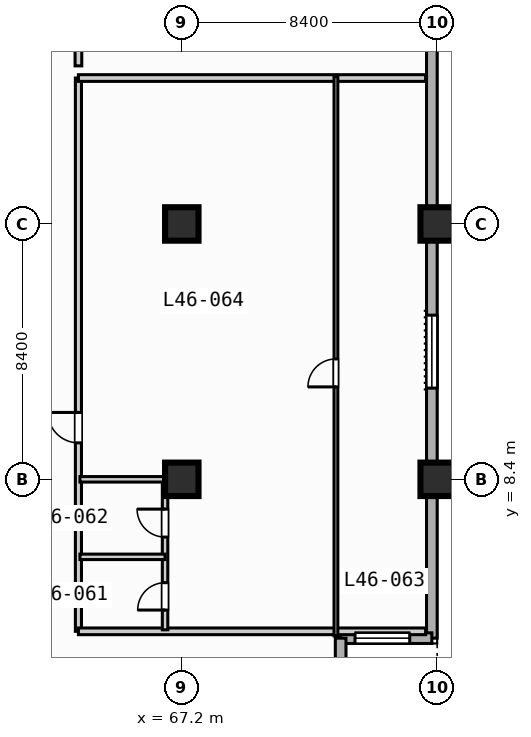
"""IFC4 building model, lengths in metres.
Left out: names, types, materials, properties, quantities, classifications, styles, units other than length and angle.
Written with IfcOpenShell. Run it as: python <this file> out.ifc"""

import sys

from ifc_helpers import new_model, si_unit, direction, frame, frame_2d, origin, origin_2d, place, context, subcontext, project, spatial, rectangle, extrude, element, fill, save


model = new_model("IFC4")
c1 = context("Model", 3, precision=1e-05, world=origin(), true_north=direction((0.0, 1.0)))
c2 = subcontext(c1, "Body", "Model", "MODEL_VIEW")
j1 = project(units=[si_unit("LENGTHUNIT", "METRE"), si_unit("PLANEANGLEUNIT", "RADIAN")], contexts=[c1])
p1 = place(None, origin())
s1 = spatial("IfcSite", under=j1, at=p1, CompositionType="ELEMENT")
p2 = place(p1, origin())
s2 = spatial("IfcBuilding", under=s1, at=p2, CompositionType="ELEMENT")
p3 = place(p2, frame((0.0, 0.0, 190.2)))
s3 = spatial("IfcBuildingStorey", under=s2, at=p3, CompositionType="ELEMENT", Elevation=190.2)
for number, where, z_axis, x_axis in (
    (1, (67.2, 8.4, 0.0), (0.0, 0.0, 1.0), (1.0, 0.0, 0.0)),
    (2, (67.2, 16.8, 0.0), (0.0, 0.0, 1.0), (1.0, 0.0, 0.0)),
    (3, (75.6, 8.4, 0.0), (0.0, 0.0, 1.0), (1.0, 0.0, 0.0)),
    (4, (75.6, 16.8, 0.0), (0.0, 0.0, 1.0), (1.0, 0.0, 0.0)),
):
    element("IfcColumn", number, at=place(p3, frame(where, z_axis=z_axis, x_axis=x_axis)), inside=s3, PredefinedType="COLUMN", context=c2, shape_type="SweptSolid", body=[
        extrude(rectangle(XDim=1.1, YDim=1.1, at=origin_2d()), origin(), (0.0, 0.0, 1.0), 3.7),
    ])
p4 = place(p3, frame((75.425, 30.425, 0.0), z_axis=(0.0, 0.0, 1.0), x_axis=(0.0, -1.0, 0.0)))
e5 = element("IfcWall", 5, at=p4, inside=s3, PredefinedType="STANDARD", context=c2, shape_type="SweptSolid", body=[
    extrude(rectangle(XDim=27.25, YDim=0.35, at=frame_2d((13.625, 0.0))), origin(), (0.0, 0.0, 1.0), 3.47),
])
p5 = place(p4, frame((16.625, 0.0, 0.85)))
e6 = element("IfcOpeningElement", 6, at=p5, cuts=e5, PredefinedType="OPENING", context=c2, shape_type="SweptSolid", body=[
    extrude(rectangle(XDim=2.4, YDim=1.95, at=frame_2d((1.2, 0.975))), frame((0.0, 0.185, 0.0), z_axis=(0.0, -1.0, 0.0), x_axis=(1.0, 0.0, 0.0)), (0.0, 0.0, 1.0), 0.37),
])
p6 = place(p3, frame((75.425, 3.175, 0.0), z_axis=(0.0, 0.0, 1.0), x_axis=(-1.0, 0.0, 0.0)))
e7 = element("IfcWall", 7, at=p6, inside=s3, PredefinedType="STANDARD", context=c2, shape_type="SweptSolid", body=[
    extrude(rectangle(XDim=3.0, YDim=0.35, at=frame_2d((1.5, 0.0))), origin(), (0.0, 0.0, 1.0), 3.47),
])
p7 = place(p6, frame((0.728, 0.0, 0.85)))
e8 = element("IfcOpeningElement", 8, at=p7, cuts=e7, PredefinedType="OPENING", context=c2, shape_type="SweptSolid", body=[
    extrude(rectangle(XDim=1.8, YDim=1.8, at=frame_2d((0.9, 0.9))), frame((0.0, 0.185, 0.0), z_axis=(0.0, -1.0, 0.0), x_axis=(1.0, 0.0, 0.0)), (0.0, 0.0, 1.0), 0.37),
])
p8 = place(p3, frame((72.425, 3.175, 0.0), z_axis=(0.0, 0.0, 1.0), x_axis=(0.0, -1.0, 0.0)))
e9 = element("IfcWall", 9, at=p8, inside=s3, PredefinedType="STANDARD", context=c2, shape_type="SweptSolid", body=[
    extrude(rectangle(XDim=3.0, YDim=0.35, at=frame_2d((1.5, 0.0))), origin(), (0.0, 0.0, 1.0), 3.47),
])
p9 = place(p3, frame((63.8, 3.4, 0.0), z_axis=(0.0, 0.0, 1.0), x_axis=(0.0, 1.0, 0.0)))
e10 = element("IfcWall", 10, at=p9, inside=s3, PredefinedType="PARTITIONING", context=c2, shape_type="SweptSolid", body=[
    extrude(rectangle(XDim=18.2, YDim=0.2, at=frame_2d((9.1, 0.0))), origin(), (0.0, 0.0, 1.0), 3.47),
])
p10 = place(p9, frame((6.2, 0.0, 0.0)))
e11 = element("IfcOpeningElement", 11, at=p10, cuts=e10, PredefinedType="OPENING", context=c2, shape_type="SweptSolid", body=[
    extrude(rectangle(XDim=1.0, YDim=2.15, at=frame_2d((0.5, 1.075))), frame((0.0, 0.11, 0.0), z_axis=(0.0, -1.0, 0.0), x_axis=(1.0, 0.0, 0.0)), (0.0, 0.0, 1.0), 0.22),
])
for number, where, z_axis, x_axis in (
    (12, (63.8, 3.4, 0.0), (0.0, 0.0, 1.0), (1.0, 0.0, 0.0)),
    (13, (63.8, 21.6, 0.0), (0.0, 0.0, 1.0), (1.0, 0.0, 0.0)),
):
    element("IfcWall", number, at=place(p3, frame(where, z_axis=z_axis, x_axis=x_axis)), inside=s3, PredefinedType="PARTITIONING", context=c2, shape_type="SweptSolid", body=[
        extrude(rectangle(XDim=11.42, YDim=0.22, at=frame_2d((5.71, 0.0))), origin(), (0.0, 0.0, 1.0), 3.47),
    ])
p11 = place(p3, frame((66.65, 3.45, 0.0), z_axis=(0.0, 0.0, 1.0), x_axis=(0.0, 1.0, 0.0)))
e14 = element("IfcWall", 14, at=p11, inside=s3, PredefinedType="PLUMBINGWALL", context=c2, shape_type="SweptSolid", body=[
    extrude(rectangle(XDim=4.95, YDim=0.18, at=frame_2d((2.475, 0.0))), origin(), (0.0, 0.0, 1.0), 3.47),
])
p12 = place(p11, frame((0.65, 0.0, 0.0)))
e15 = element("IfcOpeningElement", 15, at=p12, cuts=e14, PredefinedType="OPENING", context=c2, shape_type="SweptSolid", body=[
    extrude(rectangle(XDim=0.9, YDim=2.1, at=frame_2d((0.45, 1.05))), frame((0.0, 0.1, 0.0), z_axis=(0.0, -1.0, 0.0), x_axis=(1.0, 0.0, 0.0)), (0.0, 0.0, 1.0), 0.2),
])
p13 = place(p11, frame((3.05, 0.0, 0.0)))
e16 = element("IfcOpeningElement", 16, at=p13, cuts=e14, PredefinedType="OPENING", context=c2, shape_type="SweptSolid", body=[
    extrude(rectangle(XDim=0.92, YDim=2.1, at=frame_2d((0.46, 1.05))), frame((0.0, 0.1, 0.0), z_axis=(0.0, -1.0, 0.0), x_axis=(1.0, 0.0, 0.0)), (0.0, 0.0, 1.0), 0.2),
])
p14 = place(p3, frame((63.85, 5.85, 0.0), z_axis=(0.0, 0.0, 1.0), x_axis=(1.0, 0.0, 0.0)))
e17 = element("IfcWall", 17, at=p14, inside=s3, PredefinedType="PLUMBINGWALL", context=c2, shape_type="SweptSolid", body=[
    extrude(rectangle(XDim=2.8, YDim=0.18, at=frame_2d((1.4, 0.0))), origin(), (0.0, 0.0, 1.0), 3.47),
])
p15 = place(p3, frame((63.85, 8.4, 0.0), z_axis=(0.0, 0.0, 1.0), x_axis=(1.0, 0.0, 0.0)))
e18 = element("IfcWall", 18, at=p15, inside=s3, PredefinedType="PLUMBINGWALL", context=c2, shape_type="SweptSolid", body=[
    extrude(rectangle(XDim=2.8, YDim=0.18, at=frame_2d((1.4, 0.0))), origin(), (0.0, 0.0, 1.0), 2.82),
])
p16 = place(p3, frame((72.27, 3.25, 0.0), z_axis=(0.0, 0.0, 1.0), x_axis=(0.0, 1.0, 0.0)))
e19 = element("IfcWall", 19, at=p16, inside=s3, PredefinedType="PARTITIONING", context=c2, shape_type="SweptSolid", body=[
    extrude(rectangle(XDim=18.4, YDim=0.125, at=frame_2d((9.2, 0.0))), origin(), (0.0, 0.0, 1.0), 3.47),
])
p17 = place(p16, frame((8.19, 0.0, 0.0)))
e20 = element("IfcOpeningElement", 20, at=p17, cuts=e19, PredefinedType="OPENING", context=c2, shape_type="SweptSolid", body=[
    extrude(rectangle(XDim=0.92, YDim=2.1, at=frame_2d((0.46, 1.05))), frame((0.0, 0.073, 0.0), z_axis=(0.0, -1.0, 0.0), x_axis=(1.0, 0.0, 0.0)), (0.0, 0.0, 1.0), 0.145),
])
p18 = place(p3, frame((63.8, 22.0, 0.0), z_axis=(0.0, 0.0, 1.0), x_axis=(0.0, 1.0, 0.0)))
e21 = element("IfcWall", 21, at=p18, inside=s3, PredefinedType="PARTITIONING", context=c2, shape_type="SweptSolid", body=[
    extrude(rectangle(XDim=6.0, YDim=0.22, at=frame_2d((3.0, 0.0))), origin(), (0.0, 0.0, 1.0), 3.47),
])
p19 = place(p5, origin())
e22 = element("IfcWindow", 22, at=p19, inside=s3, PartitioningType="SINGLE_PANEL", PredefinedType="WINDOW", context=c2, shape_type="SweptSolid", body=[
    extrude(rectangle(XDim=2.4, YDim=1.95, at=frame_2d((1.2, 0.975))), frame((0.0, 0.03, 0.0), z_axis=(0.0, -1.0, 0.0), x_axis=(1.0, 0.0, 0.0)), (0.0, 0.0, 1.0), 0.06),
])
fill(e6, e22)
p20 = place(p7, origin())
e23 = element("IfcWindow", 23, at=p20, inside=s3, PartitioningType="SINGLE_PANEL", PredefinedType="WINDOW", context=c2, shape_type="SweptSolid", body=[
    extrude(rectangle(XDim=1.8, YDim=1.8, at=frame_2d((0.9, 0.9))), frame((0.0, 0.03, 0.0), z_axis=(0.0, -1.0, 0.0), x_axis=(1.0, 0.0, 0.0)), (0.0, 0.0, 1.0), 0.06),
])
fill(e8, e23)
p21 = place(p10, origin())
e24 = element("IfcDoor", 24, at=p21, inside=s3, OperationType="SINGLE_SWING_RIGHT", PredefinedType="DOOR", context=c2, shape_type="SweptSolid", body=[
    extrude(rectangle(XDim=1.0, YDim=2.15, at=frame_2d((0.5, 1.075))), frame((0.0, 0.025, 0.0), z_axis=(0.0, -1.0, 0.0), x_axis=(1.0, 0.0, 0.0)), (0.0, 0.0, 1.0), 0.05),
])
fill(e11, e24)
p22 = place(p12, origin())
e25 = element("IfcDoor", 25, at=p22, inside=s3, OperationType="SINGLE_SWING_LEFT", PredefinedType="DOOR", context=c2, shape_type="SweptSolid", body=[
    extrude(rectangle(XDim=0.9, YDim=2.1, at=frame_2d((0.45, 1.05))), frame((0.0, 0.025, 0.0), z_axis=(0.0, -1.0, 0.0), x_axis=(1.0, 0.0, 0.0)), (0.0, 0.0, 1.0), 0.05),
])
fill(e15, e25)
p23 = place(p13, origin())
e26 = element("IfcDoor", 26, at=p23, inside=s3, OperationType="SINGLE_SWING_RIGHT", PredefinedType="DOOR", context=c2, shape_type="SweptSolid", body=[
    extrude(rectangle(XDim=0.92, YDim=2.1, at=frame_2d((0.46, 1.05))), frame((0.0, 0.025, 0.0), z_axis=(0.0, -1.0, 0.0), x_axis=(1.0, 0.0, 0.0)), (0.0, 0.0, 1.0), 0.05),
])
fill(e16, e26)
p24 = place(p17, origin())
e27 = element("IfcDoor", 27, at=p24, inside=s3, OperationType="SINGLE_SWING_LEFT", PredefinedType="DOOR", context=c2, shape_type="SweptSolid", body=[
    extrude(rectangle(XDim=0.92, YDim=2.1, at=frame_2d((0.46, 1.05))), frame((0.0, 0.025, 0.0), z_axis=(0.0, -1.0, 0.0), x_axis=(1.0, 0.0, 0.0)), (0.0, 0.0, 1.0), 0.05),
])
fill(e20, e27)
save(model, sys.argv[1])
